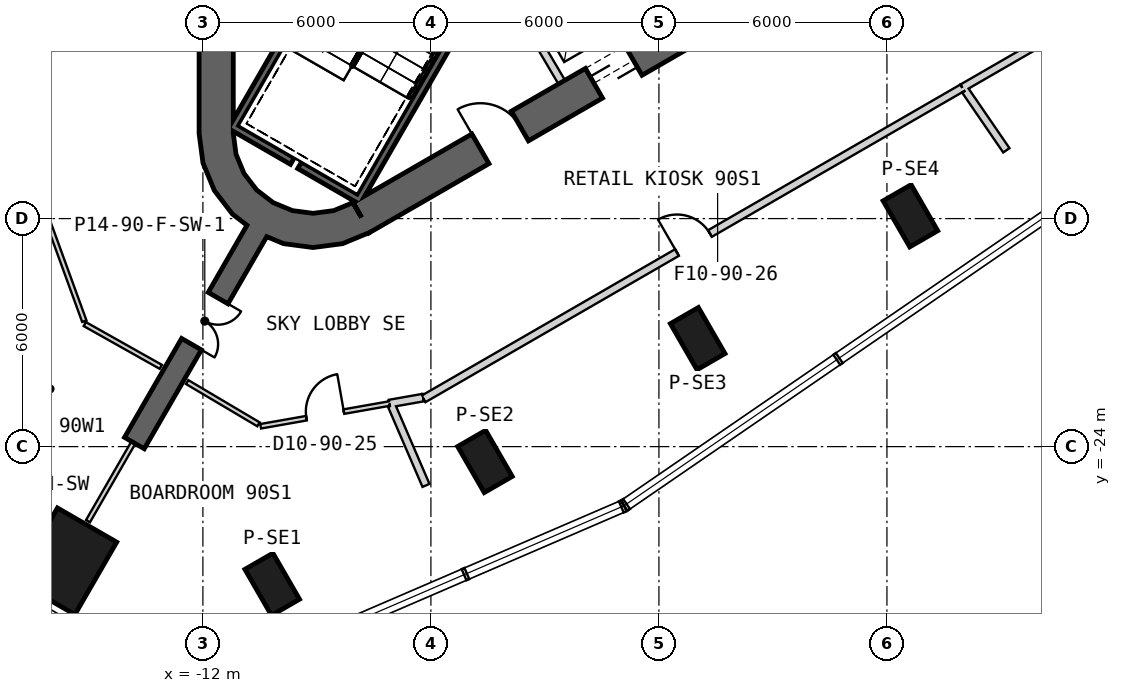
"""IFC4 building model, lengths in metres.
Left out: names, types, materials, properties, quantities, classifications, styles, units other than length and angle.
Written with IfcOpenShell. Run it as: python <this file> out.ifc"""

import sys

from ifc_helpers import new_model, si_unit, direction, frame, frame_2d, origin, origin_2d, place, context, subcontext, project, spatial, polyline, rectangle, outline, extrude, element, fill, save


model = new_model("IFC4")
c1 = context("Model", 3, precision=1e-05, world=origin(), true_north=direction((0.0, 1.0)))
c2 = subcontext(c1, "Body", "Model", "MODEL_VIEW")
j1 = project(units=[si_unit("LENGTHUNIT", "METRE"), si_unit("PLANEANGLEUNIT", "RADIAN")], contexts=[c1])
p1 = place(None, origin())
s1 = spatial("IfcSite", under=j1, at=p1, CompositionType="ELEMENT")
p2 = place(p1, origin())
s2 = spatial("IfcBuilding", under=s1, at=p2, CompositionType="ELEMENT")
p3 = place(p2, frame((0.0, 0.0, 392.3)))
s3 = spatial("IfcBuildingStorey", under=s2, at=p3, CompositionType="ELEMENT", Elevation=392.3)
p4 = place(p3, frame((-15.598, -27.016, 0.0), z_axis=(0.0, 0.0, 1.0), x_axis=(-0.5, -0.866025403784, 0.0)))
e1 = element("IfcColumn", 1, at=p4, inside=s3, PredefinedType="COLUMN", context=c2, shape_type="SweptSolid", body=[
    extrude(rectangle(XDim=2.2, YDim=1.8, at=origin_2d()), origin(), (0.0, 0.0, 1.0), 5.7),
])
for number, where, z_axis, x_axis in (
    (2, (-10.176, -27.623, 0.0), (0.0, 0.0, 1.0), (0.5, -0.866, 0.0)),
    (3, (-4.578, -24.391, 0.0), (0.0, 0.0, 1.0), (0.5, -0.866, 0.0)),
    (4, (1.02, -21.159, 0.0), (0.0, 0.0, 1.0), (0.5, -0.866, 0.0)),
    (5, (6.618, -17.927, 0.0), (0.0, 0.0, 1.0), (0.5, -0.866, 0.0)),
):
    element("IfcColumn", number, at=place(p3, frame(where, z_axis=z_axis, x_axis=x_axis)), inside=s3, PredefinedType="COLUMN", context=c2, shape_type="SweptSolid", body=[
        extrude(rectangle(XDim=1.4, YDim=0.85, at=origin_2d()), origin(), (0.0, 0.0, 1.0), 5.7),
    ])
p5 = place(p3, frame((-11.65, 15.762, 0.0), z_axis=(0.0, 0.0, 1.0), x_axis=(0.0, -1.0, 0.0)))
e6 = element("IfcWall", 6, at=p5, inside=s3, PredefinedType="SHEAR", context=c2, shape_type="SweptSolid", body=[
    extrude(rectangle(XDim=31.523, YDim=0.9, at=frame_2d((15.762, 0.0))), origin(), (0.0, 0.0, 1.0), 6.0),
])
p6 = place(p5, frame((7.062, 0.0, 0.0)))
e7 = element("IfcOpeningElement", 7, at=p6, cuts=e6, PredefinedType="OPENING", context=c2, shape_type="SweptSolid", body=[
    extrude(rectangle(XDim=1.2, YDim=2.4, at=frame_2d((0.6, 1.2))), frame((0.0, 0.46, 0.0), z_axis=(0.0, -1.0, 0.0), x_axis=(1.0, 0.0, 0.0)), (0.0, 0.0, 1.0), 0.92),
])
p7 = place(p5, frame((9.762, 0.0, 0.0)))
e8 = element("IfcOpeningElement", 8, at=p7, cuts=e6, PredefinedType="OPENING", context=c2, shape_type="SweptSolid", body=[
    extrude(rectangle(XDim=1.2, YDim=2.4, at=frame_2d((0.6, 1.2))), frame((0.0, 0.46, 0.0), z_axis=(0.0, -1.0, 0.0), x_axis=(1.0, 0.0, 0.0)), (0.0, 0.0, 1.0), 0.92),
])
p8 = place(p5, frame((12.462, 0.0, 0.0)))
e9 = element("IfcOpeningElement", 9, at=p8, cuts=e6, PredefinedType="OPENING", context=c2, shape_type="SweptSolid", body=[
    extrude(rectangle(XDim=1.2, YDim=2.4, at=frame_2d((0.6, 1.2))), frame((0.0, 0.46, 0.0), z_axis=(0.0, -1.0, 0.0), x_axis=(1.0, 0.0, 0.0)), (0.0, 0.0, 1.0), 0.92),
])
p9 = place(p5, frame((15.162, 0.0, 0.0)))
e10 = element("IfcOpeningElement", 10, at=p9, cuts=e6, PredefinedType="OPENING", context=c2, shape_type="SweptSolid", body=[
    extrude(rectangle(XDim=1.2, YDim=2.4, at=frame_2d((0.6, 1.2))), frame((0.0, 0.46, 0.0), z_axis=(0.0, -1.0, 0.0), x_axis=(1.0, 0.0, 0.0)), (0.0, 0.0, 1.0), 0.92),
])
p10 = place(p5, frame((17.862, 0.0, 0.0)))
e11 = element("IfcOpeningElement", 11, at=p10, cuts=e6, PredefinedType="OPENING", context=c2, shape_type="SweptSolid", body=[
    extrude(rectangle(XDim=1.2, YDim=2.4, at=frame_2d((0.6, 1.2))), frame((0.0, 0.46, 0.0), z_axis=(0.0, -1.0, 0.0), x_axis=(1.0, 0.0, 0.0)), (0.0, 0.0, 1.0), 0.92),
])
p11 = place(p5, frame((20.562, 0.0, 0.0)))
e12 = element("IfcOpeningElement", 12, at=p11, cuts=e6, PredefinedType="OPENING", context=c2, shape_type="SweptSolid", body=[
    extrude(rectangle(XDim=1.2, YDim=2.4, at=frame_2d((0.6, 1.2))), frame((0.0, 0.46, 0.0), z_axis=(0.0, -1.0, 0.0), x_axis=(1.0, 0.0, 0.0)), (0.0, 0.0, 1.0), 0.92),
])
p12 = place(p5, frame((23.262, 0.0, 0.0)))
e13 = element("IfcOpeningElement", 13, at=p12, cuts=e6, PredefinedType="OPENING", context=c2, shape_type="SweptSolid", body=[
    extrude(rectangle(XDim=1.2, YDim=2.4, at=frame_2d((0.6, 1.2))), frame((0.0, 0.46, 0.0), z_axis=(0.0, -1.0, 0.0), x_axis=(1.0, 0.0, 0.0)), (0.0, 0.0, 1.0), 0.92),
])
p13 = place(p5, frame((3.612, 0.0, 0.0)))
e14 = element("IfcOpeningElement", 14, at=p13, cuts=e6, PredefinedType="OPENING", context=c2, shape_type="SweptSolid", body=[
    extrude(rectangle(XDim=1.2, YDim=2.4, at=frame_2d((0.6, 1.2))), frame((0.0, 0.46, 0.0), z_axis=(0.0, -1.0, 0.0), x_axis=(1.0, 0.0, 0.0)), (0.0, 0.0, 1.0), 0.92),
])
p14 = place(p5, frame((26.712, 0.0, 0.0)))
e15 = element("IfcOpeningElement", 15, at=p14, cuts=e6, PredefinedType="OPENING", context=c2, shape_type="SweptSolid", body=[
    extrude(rectangle(XDim=1.2, YDim=2.4, at=frame_2d((0.6, 1.2))), frame((0.0, 0.46, 0.0), z_axis=(0.0, -1.0, 0.0), x_axis=(1.0, 0.0, 0.0)), (0.0, 0.0, 1.0), 0.92),
])
p15 = place(p3, frame((-7.825, -17.97, 0.0), z_axis=(0.0, 0.0, 1.0), x_axis=(0.866028369851, 0.499994862586, 0.0)))
e16 = element("IfcWall", 16, at=p15, inside=s3, PredefinedType="SHEAR", context=c2, shape_type="SweptSolid", body=[
    extrude(rectangle(XDim=31.523, YDim=0.9, at=frame_2d((15.762, 0.0))), origin(), (0.0, 0.0, 1.0), 6.0),
])
p16 = place(p15, frame((7.062, 0.0, 0.0)))
e17 = element("IfcOpeningElement", 17, at=p16, cuts=e16, PredefinedType="OPENING", context=c2, shape_type="SweptSolid", body=[
    extrude(rectangle(XDim=1.2, YDim=2.4, at=frame_2d((0.6, 1.2))), frame((0.0, 0.46, 0.0), z_axis=(0.0, -1.0, 0.0), x_axis=(1.0, 0.0, 0.0)), (0.0, 0.0, 1.0), 0.92),
])
p17 = place(p15, frame((9.762, 0.0, 0.0)))
e18 = element("IfcOpeningElement", 18, at=p17, cuts=e16, PredefinedType="OPENING", context=c2, shape_type="SweptSolid", body=[
    extrude(rectangle(XDim=1.2, YDim=2.4, at=frame_2d((0.6, 1.2))), frame((0.0, 0.46, 0.0), z_axis=(0.0, -1.0, 0.0), x_axis=(1.0, 0.0, 0.0)), (0.0, 0.0, 1.0), 0.92),
])
p18 = place(p15, frame((17.862, 0.0, 0.0)))
e19 = element("IfcOpeningElement", 19, at=p18, cuts=e16, PredefinedType="OPENING", context=c2, shape_type="SweptSolid", body=[
    extrude(rectangle(XDim=1.2, YDim=2.4, at=frame_2d((0.6, 1.2))), frame((0.0, 0.46, 0.0), z_axis=(0.0, -1.0, 0.0), x_axis=(1.0, 0.0, 0.0)), (0.0, 0.0, 1.0), 0.92),
])
p19 = place(p15, frame((20.562, 0.0, 0.0)))
e20 = element("IfcOpeningElement", 20, at=p19, cuts=e16, PredefinedType="OPENING", context=c2, shape_type="SweptSolid", body=[
    extrude(rectangle(XDim=1.2, YDim=2.4, at=frame_2d((0.6, 1.2))), frame((0.0, 0.46, 0.0), z_axis=(0.0, -1.0, 0.0), x_axis=(1.0, 0.0, 0.0)), (0.0, 0.0, 1.0), 0.92),
])
p20 = place(p15, frame((26.712, 0.0, 0.0)))
e21 = element("IfcOpeningElement", 21, at=p20, cuts=e16, PredefinedType="OPENING", context=c2, shape_type="SweptSolid", body=[
    extrude(rectangle(XDim=1.2, YDim=2.4, at=frame_2d((0.6, 1.2))), frame((0.0, 0.46, 0.0), z_axis=(0.0, -1.0, 0.0), x_axis=(1.0, 0.0, 0.0)), (0.0, 0.0, 1.0), 0.92),
])
p21 = place(p15, frame((3.612, 0.0, 0.0)))
e22 = element("IfcOpeningElement", 22, at=p21, cuts=e16, PredefinedType="OPENING", context=c2, shape_type="SweptSolid", body=[
    extrude(rectangle(XDim=1.2, YDim=2.4, at=frame_2d((0.6, 1.2))), frame((0.0, 0.46, 0.0), z_axis=(0.0, -1.0, 0.0), x_axis=(1.0, 0.0, 0.0)), (0.0, 0.0, 1.0), 0.92),
])
p22 = place(p3, origin())
e23 = element("IfcWall", 23, at=p22, inside=s3, PredefinedType="SHEAR", context=c2, shape_type="SweptSolid", body=[
    extrude(outline(polyline([(-12.1, -15.762), (-11.998, -16.538), (-11.698, -17.262), (-11.221, -17.883), (-10.6, -18.36), (-9.876, -18.659), (-9.1, -18.762), (-8.323, -18.659), (-7.6, -18.36), (-8.05, -17.58), (-8.556, -17.79), (-9.1, -17.862), (-9.644, -17.79), (-10.15, -17.58), (-10.585, -17.247), (-10.919, -16.812), (-11.128, -16.305), (-11.2, -15.762), (-12.1, -15.762)])), origin(), (0.0, 0.0, 1.0), 6.0),
])
p23 = place(p3, frame((-10.575, -18.316, 0.0), z_axis=(0.0, 0.0, 1.0), x_axis=(-0.500011655475, -0.866018674388, 0.0)))
e24 = element("IfcWall", 24, at=p23, inside=s3, PredefinedType="SHEAR", context=c2, shape_type="SweptSolid", body=[
    extrude(rectangle(XDim=6.455, YDim=0.6, at=frame_2d((3.228, 0.0))), origin(), (0.0, 0.0, 1.0), 6.0),
])
p24 = place(p23, frame((2.05, 0.0, 0.0)))
e25 = element("IfcOpeningElement", 25, at=p24, cuts=e24, PredefinedType="OPENING", context=c2, shape_type="SweptSolid", body=[
    extrude(rectangle(XDim=1.4, YDim=2.4, at=frame_2d((0.7, 1.2))), frame((0.0, 0.31, 0.0), z_axis=(0.0, -1.0, 0.0), x_axis=(1.0, 0.0, 0.0)), (0.0, 0.0, 1.0), 0.62),
])
p25 = place(p3, frame((-2.558, -14.409, 0.0), z_axis=(0.0, 0.0, 1.0), x_axis=(-0.507997497166, 0.861358544901, 0.0)))
e26 = element("IfcWall", 26, at=p25, inside=s3, PredefinedType="PLUMBINGWALL", context=c2, shape_type="SweptSolid", body=[
    extrude(rectangle(XDim=3.35, YDim=0.2, at=frame_2d((1.675, 0.0))), origin(), (0.0, 0.0, 1.0), 5.7),
])
p26 = place(p3, frame((-3.905, -10.563, -0.35), z_axis=(0.0, 0.0, 1.0), x_axis=(-0.500012932018, -0.866017937352, 0.0)))
e27 = element("IfcWall", 27, at=p26, inside=s3, PredefinedType="SHEAR", context=c2, shape_type="SweptSolid", body=[
    extrude(rectangle(XDim=8.1, YDim=0.2, at=frame_2d((4.05, 0.0))), origin(), (0.0, 0.0, 1.0), 6.05),
])
p27 = place(p3, frame((-11.282, -15.541, -0.35), z_axis=(0.0, 0.0, 1.0), x_axis=(0.866000578957, -0.500042995397, 0.0)))
e28 = element("IfcWall", 28, at=p27, inside=s3, PredefinedType="SHEAR", context=c2, shape_type="SweptSolid", body=[
    extrude(rectangle(XDim=1.89, YDim=0.2, at=frame_2d((0.945, 0.0))), origin(), (0.0, 0.0, 1.0), 6.05),
])
p28 = place(p3, frame((-9.455, -16.596, -0.35), z_axis=(0.0, 0.0, 1.0), x_axis=(0.866038843867, -0.499976720371, 0.0)))
e29 = element("IfcWall", 29, at=p28, inside=s3, PredefinedType="SHEAR", context=c2, shape_type="SweptSolid", body=[
    extrude(rectangle(XDim=1.69, YDim=0.2, at=frame_2d((0.845, 0.0))), origin(), (0.0, 0.0, 1.0), 6.05),
])
p29 = place(p3, frame((-7.196, -8.663, -0.35), z_axis=(0.0, 0.0, 1.0), x_axis=(-0.499997992926, -0.866026562566, 0.0)))
e30 = element("IfcWall", 30, at=p29, inside=s3, PredefinedType="SHEAR", context=c2, shape_type="SweptSolid", body=[
    extrude(rectangle(XDim=7.9, YDim=0.2, at=frame_2d((3.95, 0.0))), origin(), (0.0, 0.0, 1.0), 6.05),
])
p30 = place(p3, frame((-15.108, -20.776, 0.0), z_axis=(0.0, 0.0, 1.0), x_axis=(0.87159257267, -0.490230952986, 0.0)))
e31 = element("IfcWall", 31, at=p30, inside=s3, PredefinedType="PARTITIONING", context=c2, shape_type="SweptSolid", body=[
    extrude(rectangle(XDim=2.296, YDim=0.12, at=frame_2d((1.148, 0.0))), origin(), (0.0, 0.0, 1.0), 5.7),
])
p31 = place(p3, frame((-16.621, -16.578, 0.0), z_axis=(0.0, 0.0, 1.0), x_axis=(0.342055849832, -0.939679623912, 0.0)))
e32 = element("IfcWall", 32, at=p31, inside=s3, PredefinedType="PARTITIONING", context=c2, shape_type="SweptSolid", body=[
    extrude(rectangle(XDim=4.387, YDim=0.12, at=frame_2d((2.193, 0.0))), origin(), (0.0, 0.0, 1.0), 5.07),
])
p32 = place(p3, frame((-15.024, -25.962, 0.0), z_axis=(0.0, 0.0, 1.0), x_axis=(0.500037706602, 0.866003632773, 0.0)))
e33 = element("IfcWall", 33, at=p32, inside=s3, PredefinedType="PARTITIONING", context=c2, shape_type="SweptSolid", body=[
    extrude(rectangle(XDim=2.391, YDim=0.12, at=frame_2d((1.195, 0.0))), origin(), (0.0, 0.0, 1.0), 5.27),
])
p33 = place(p3, frame((-10.479, -23.464, 0.0), z_axis=(0.0, 0.0, 1.0), x_axis=(0.984812129081, 0.173623357916, 0.0)))
e34 = element("IfcWall", 34, at=p33, inside=s3, PredefinedType="PARTITIONING", context=c2, shape_type="SweptSolid", body=[
    extrude(rectangle(XDim=3.439, YDim=0.12, at=frame_2d((1.72, 0.0))), origin(), (0.0, 0.0, 1.0), 5.07),
])
p34 = place(p33, frame((1.222, 0.0, 0.0)))
e35 = element("IfcOpeningElement", 35, at=p34, cuts=e34, PredefinedType="OPENING", context=c2, shape_type="SweptSolid", body=[
    extrude(rectangle(XDim=1.0, YDim=2.1, at=frame_2d((0.5, 1.05))), frame((0.0, 0.07, 0.0), z_axis=(0.0, -1.0, 0.0), x_axis=(1.0, 0.0, 0.0)), (0.0, 0.0, 1.0), 0.14),
])
p35 = place(p3, frame((-12.414, -22.302, 0.0), z_axis=(0.0, 0.0, 1.0), x_axis=(0.860362411229, -0.509682765398, 0.0)))
e36 = element("IfcWall", 36, at=p35, inside=s3, PredefinedType="PARTITIONING", context=c2, shape_type="SweptSolid", body=[
    extrude(rectangle(XDim=2.182, YDim=0.12, at=frame_2d((1.091, 0.0))), origin(), (0.0, 0.0, 1.0), 5.7),
])
p36 = place(p3, frame((-6.192, -22.743, 0.0), z_axis=(0.0, 0.0, 1.0), x_axis=(0.86602812093, 0.499995293736, 0.0)))
e37 = element("IfcWall", 37, at=p36, inside=s3, PredefinedType="PARTITIONING", context=c2, shape_type="SweptSolid", body=[
    extrude(rectangle(XDim=16.369, YDim=0.2, at=frame_2d((8.185, 0.0))), origin(), (0.0, 0.0, 1.0), 5.07),
])
p37 = place(p36, frame((7.7, 0.0, 0.0)))
e38 = element("IfcOpeningElement", 38, at=p37, cuts=e37, PredefinedType="OPENING", context=c2, shape_type="SweptSolid", body=[
    extrude(rectangle(XDim=1.0, YDim=2.1, at=frame_2d((0.5, 1.05))), frame((0.0, 0.11, 0.0), z_axis=(0.0, -1.0, 0.0), x_axis=(1.0, 0.0, 0.0)), (0.0, 0.0, 1.0), 0.22),
])
p38 = place(p3, frame((7.984, -14.559, 0.0), z_axis=(0.0, 0.0, 1.0), x_axis=(0.866028009752, 0.499995486305, 0.0)))
e39 = element("IfcWall", 39, at=p38, inside=s3, PredefinedType="PARTITIONING", context=c2, shape_type="SweptSolid", body=[
    extrude(rectangle(XDim=16.9, YDim=0.2, at=frame_2d((8.45, 0.0))), origin(), (0.0, 0.0, 1.0), 5.07),
])
p39 = place(p38, frame((8.056, 0.0, 0.0)))
e40 = element("IfcOpeningElement", 40, at=p39, cuts=e39, PredefinedType="OPENING", context=c2, shape_type="SweptSolid", body=[
    extrude(rectangle(XDim=1.0, YDim=2.1, at=frame_2d((0.5, 1.05))), frame((0.0, 0.11, 0.0), z_axis=(0.0, -1.0, 0.0), x_axis=(1.0, 0.0, 0.0)), (0.0, 0.0, 1.0), 0.22),
])
p40 = place(p3, frame((-7.092, -22.867, 0.0), z_axis=(0.0, 0.0, 1.0), x_axis=(0.984821698497, 0.173569070315, 0.0)))
e41 = element("IfcWall", 41, at=p40, inside=s3, PredefinedType="PARTITIONING", context=c2, shape_type="SweptSolid", body=[
    extrude(rectangle(XDim=0.902, YDim=0.2, at=frame_2d((0.451, 0.0))), origin(), (0.0, 0.0, 1.0), 5.7),
])
p41 = place(p3, frame((-7.035, -22.918, 0.0), z_axis=(0.0, 0.0, 1.0), x_axis=(0.395604523809, -0.91842096053, 0.0)))
e42 = element("IfcWall", 42, at=p41, inside=s3, PredefinedType="PARTITIONING", context=c2, shape_type="SweptSolid", body=[
    extrude(rectangle(XDim=2.29, YDim=0.2, at=frame_2d((1.145, 0.0))), origin(), (0.0, 0.0, 1.0), 5.7),
])
p42 = place(p3, frame((8.062, -14.629, 0.0), z_axis=(0.0, 0.0, 1.0), x_axis=(0.565801599427, -0.824541418054, 0.0)))
e43 = element("IfcWall", 43, at=p42, inside=s3, PredefinedType="PARTITIONING", context=c2, shape_type="SweptSolid", body=[
    extrude(rectangle(XDim=1.91, YDim=0.2, at=frame_2d((0.955, 0.0))), origin(), (0.0, 0.0, 1.0), 4.07),
])
p43 = place(p34, origin())
e44 = element("IfcDoor", 44, at=p43, inside=s3, OperationType="SINGLE_SWING_RIGHT", PredefinedType="NOTDEFINED", context=c2, shape_type="SweptSolid", body=[
    extrude(rectangle(XDim=1.0, YDim=2.1, at=frame_2d((0.5, 1.05))), frame((0.0, 0.025, 0.0), z_axis=(0.0, -1.0, 0.0), x_axis=(1.0, 0.0, 0.0)), (0.0, 0.0, 1.0), 0.05),
])
fill(e35, e44)
p44 = place(p37, origin())
e45 = element("IfcDoor", 45, at=p44, inside=s3, OperationType="SINGLE_SWING_LEFT", PredefinedType="USERDEFINED", context=c2, shape_type="SweptSolid", body=[
    extrude(rectangle(XDim=1.0, YDim=2.1, at=frame_2d((0.5, 1.05))), frame((0.0, 0.025, 0.0), z_axis=(0.0, -1.0, 0.0), x_axis=(1.0, 0.0, 0.0)), (0.0, 0.0, 1.0), 0.05),
])
fill(e38, e45)
p45 = place(p16, origin())
e46 = element("IfcDoor", 46, at=p45, inside=s3, OperationType="SLIDING_TO_LEFT", PredefinedType="USERDEFINED", context=c2, shape_type="SweptSolid", body=[
    extrude(rectangle(XDim=1.2, YDim=2.4, at=frame_2d((0.6, 1.2))), frame((0.0, 0.025, 0.0), z_axis=(0.0, -1.0, 0.0), x_axis=(1.0, 0.0, 0.0)), (0.0, 0.0, 1.0), 0.05),
])
fill(e17, e46)
p46 = place(p21, origin())
e47 = element("IfcDoor", 47, at=p46, inside=s3, OperationType="SINGLE_SWING_LEFT", PredefinedType="USERDEFINED", context=c2, shape_type="SweptSolid", body=[
    extrude(rectangle(XDim=1.2, YDim=2.4, at=frame_2d((0.6, 1.2))), frame((0.0, 0.025, 0.0), z_axis=(0.0, -1.0, 0.0), x_axis=(1.0, 0.0, 0.0)), (0.0, 0.0, 1.0), 0.05),
])
fill(e22, e47)
p47 = place(p24, origin())
e48 = element("IfcDoor", 48, at=p47, inside=s3, OperationType="DOUBLE_DOOR_SINGLE_SWING", PredefinedType="NOTDEFINED", context=c2, shape_type="SweptSolid", body=[
    extrude(rectangle(XDim=1.4, YDim=2.4, at=frame_2d((0.7, 1.2))), frame((0.0, 0.025, 0.0), z_axis=(0.0, -1.0, 0.0), x_axis=(1.0, 0.0, 0.0)), (0.0, 0.0, 1.0), 0.05),
])
fill(e25, e48)
save(model, sys.argv[1])
